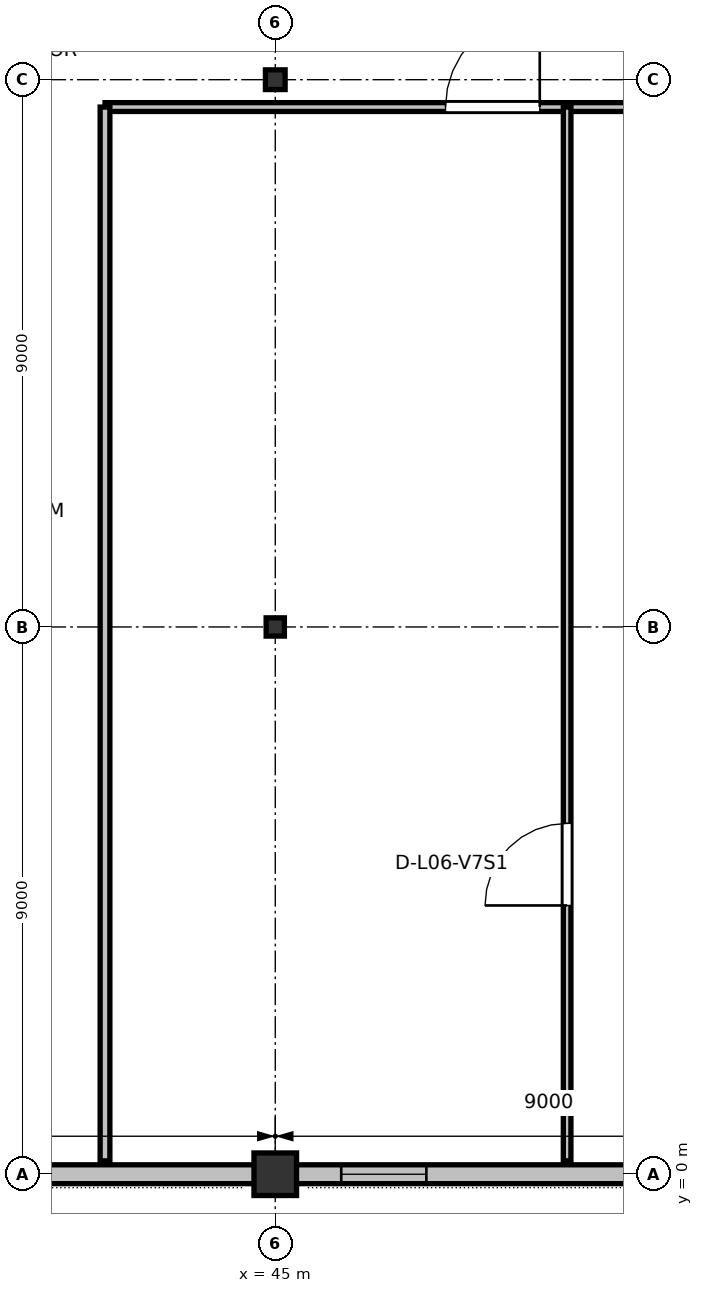
"""IFC4 building model, lengths in metres.
Left out: names, types, materials, properties, quantities, classifications, styles, units other than length and angle.
Written with IfcOpenShell. Run it as: python <this file> out.ifc"""

import sys

from ifc_helpers import new_model, si_unit, direction, frame, frame_2d, origin, origin_2d, place, context, subcontext, project, spatial, rectangle, hollow_circle, i_section, extrude, element, fill, save


model = new_model("IFC4")
c1 = context("Model", 3, precision=1e-05, world=origin(), true_north=direction((0.0, 1.0)))
c2 = subcontext(c1, "Body", "Model", "MODEL_VIEW")
j1 = project(units=[si_unit("LENGTHUNIT", "METRE"), si_unit("PLANEANGLEUNIT", "RADIAN")], contexts=[c1])
p1 = place(None, origin())
s1 = spatial("IfcSite", under=j1, at=p1, CompositionType="ELEMENT")
p2 = place(p1, origin())
s2 = spatial("IfcBuilding", under=s1, at=p2, CompositionType="ELEMENT")
p3 = place(p2, frame((0.0, 0.0, 27.6)))
s3 = spatial("IfcBuildingStorey", under=s2, at=p3, CompositionType="ELEMENT", Elevation=27.6)
p4 = place(p3, frame((45.0, 0.0, 0.0), z_axis=(0.0, 0.0, 1.0), x_axis=(1.0, 0.0, 0.0)))
e1 = element("IfcColumn", 1, at=p4, inside=s3, PredefinedType="COLUMN", context=c2, shape_type="SweptSolid", body=[
    extrude(rectangle(XDim=0.7, YDim=0.7, at=origin_2d()), origin(), (0.0, 0.0, 1.0), 4.2),
])
p5 = place(p3, frame((45.0, 9.0, 0.0), z_axis=(0.0, 0.0, 1.0), x_axis=(1.0, 0.0, 0.0)))
e2 = element("IfcColumn", 2, at=p5, inside=s3, PredefinedType="COLUMN", context=c2, shape_type="SweptSolid", body=[
    extrude(i_section(OverallWidth=0.3, OverallDepth=0.3, WebThickness=0.011, FlangeThickness=0.019, at=origin_2d()), origin(), (0.0, 0.0, 1.0), 4.2),
])
p6 = place(p3, frame((45.0, 18.0, 0.0), z_axis=(0.0, 0.0, 1.0), x_axis=(1.0, 0.0, 0.0)))
e3 = element("IfcColumn", 3, at=p6, inside=s3, PredefinedType="COLUMN", context=c2, shape_type="SweptSolid", body=[
    extrude(hollow_circle(Radius=0.162, WallThickness=0.016, at=origin_2d()), origin(), (0.0, 0.0, 1.0), 4.2),
])
p7 = place(p3, frame((36.335, 0.0, 0.0), z_axis=(0.0, 0.0, 1.0), x_axis=(1.0, 0.0, 0.0)))
e4 = element("IfcWall", 4, at=p7, inside=s3, PredefinedType="STANDARD", context=c2, shape_type="SweptSolid", body=[
    extrude(rectangle(XDim=8.33, YDim=0.31, at=frame_2d((4.165, 0.0))), origin(), (0.0, 0.0, 1.0), 3.715),
])
p8 = place(p7, frame((0.75, 0.0, 0.9)))
e5 = element("IfcOpeningElement", 5, at=p8, cuts=e4, PredefinedType="OPENING", context=c2, shape_type="SweptSolid", body=[
    extrude(rectangle(XDim=1.6, YDim=1.5, at=frame_2d((0.8, 0.75))), frame((0.0, 0.165, 0.0), z_axis=(0.0, -1.0, 0.0), x_axis=(1.0, 0.0, 0.0)), (0.0, 0.0, 1.0), 0.33),
])
p9 = place(p3, frame((45.335, 0.0, 0.0), z_axis=(0.0, 0.0, 1.0), x_axis=(1.0, 0.0, 0.0)))
e6 = element("IfcWall", 6, at=p9, inside=s3, PredefinedType="STANDARD", context=c2, shape_type="SweptSolid", body=[
    extrude(rectangle(XDim=8.33, YDim=0.31, at=frame_2d((4.165, 0.0))), origin(), (0.0, 0.0, 1.0), 3.715),
])
p10 = place(p9, frame((0.75, 0.0, 0.9)))
e7 = element("IfcOpeningElement", 7, at=p10, cuts=e6, PredefinedType="OPENING", context=c2, shape_type="SweptSolid", body=[
    extrude(rectangle(XDim=1.4, YDim=1.45, at=frame_2d((0.7, 0.725))), frame((0.0, 0.165, 0.0), z_axis=(0.0, -1.0, 0.0), x_axis=(1.0, 0.0, 0.0)), (0.0, 0.0, 1.0), 0.33),
])
p11 = place(p3, frame((42.2, 17.55, 0.0), z_axis=(0.0, 0.0, 1.0), x_axis=(1.0, 0.0, 0.0)))
e8 = element("IfcWall", 8, at=p11, inside=s3, PredefinedType="PARTITIONING", context=c2, shape_type="SweptSolid", body=[
    extrude(rectangle(XDim=23.6, YDim=0.145, at=frame_2d((11.8, 0.0))), origin(), (0.0, 0.0, 1.0), 3.96),
])
p12 = place(p11, frame((5.6, 0.0, 0.0)))
e9 = element("IfcOpeningElement", 9, at=p12, cuts=e8, PredefinedType="OPENING", context=c2, shape_type="SweptSolid", body=[
    extrude(rectangle(XDim=1.55, YDim=2.24, at=frame_2d((0.775, 1.12))), frame((0.0, 0.083, 0.0), z_axis=(0.0, -1.0, 0.0), x_axis=(1.0, 0.0, 0.0)), (0.0, 0.0, 1.0), 0.165),
])
p13 = place(p11, frame((15.1, 0.0, 0.0)))
e10 = element("IfcOpeningElement", 10, at=p13, cuts=e8, PredefinedType="OPENING", context=c2, shape_type="SweptSolid", body=[
    extrude(rectangle(XDim=1.05, YDim=2.15, at=frame_2d((0.525, 1.075))), frame((0.0, 0.083, 0.0), z_axis=(0.0, -1.0, 0.0), x_axis=(1.0, 0.0, 0.0)), (0.0, 0.0, 1.0), 0.165),
])
p14 = place(p11, frame((17.05, 0.0, 0.0)))
e11 = element("IfcOpeningElement", 11, at=p14, cuts=e8, PredefinedType="OPENING", context=c2, shape_type="SweptSolid", body=[
    extrude(rectangle(XDim=1.0, YDim=2.14, at=frame_2d((0.5, 1.07))), frame((0.0, 0.083, 0.0), z_axis=(0.0, -1.0, 0.0), x_axis=(1.0, 0.0, 0.0)), (0.0, 0.0, 1.0), 0.165),
])
p15 = place(p3, frame((42.2, 0.22, 0.0), z_axis=(0.0, 0.0, 1.0), x_axis=(0.0, 1.0, 0.0)))
e12 = element("IfcWall", 12, at=p15, inside=s3, PredefinedType="PARTITIONING", context=c2, shape_type="SweptSolid", body=[
    extrude(rectangle(XDim=17.33, YDim=0.16, at=frame_2d((8.665, 0.0))), origin(), (0.0, 0.0, 1.0), 3.96),
])
p16 = place(p3, frame((49.8, 0.22, 0.0), z_axis=(0.0, 0.0, 1.0), x_axis=(0.0, 1.0, 0.0)))
e13 = element("IfcWall", 13, at=p16, inside=s3, PredefinedType="PARTITIONING", context=c2, shape_type="SweptSolid", body=[
    extrude(rectangle(XDim=17.33, YDim=0.125, at=frame_2d((8.665, 0.0))), origin(), (0.0, 0.0, 1.0), 3.96),
])
p17 = place(p16, frame((4.2, 0.0, 0.0)))
e14 = element("IfcOpeningElement", 14, at=p17, cuts=e13, PredefinedType="OPENING", context=c2, shape_type="SweptSolid", body=[
    extrude(rectangle(XDim=1.35, YDim=2.18, at=frame_2d((0.675, 1.09))), frame((0.0, 0.073, 0.0), z_axis=(0.0, -1.0, 0.0), x_axis=(1.0, 0.0, 0.0)), (0.0, 0.0, 1.0), 0.145),
])
p18 = place(p10, origin())
e15 = element("IfcWindow", 15, at=p18, inside=s3, PartitioningType="SINGLE_PANEL", PredefinedType="WINDOW", context=c2, shape_type="SweptSolid", body=[
    extrude(rectangle(XDim=1.4, YDim=1.45, at=frame_2d((0.7, 0.725))), frame((0.0, 0.03, 0.0), z_axis=(0.0, -1.0, 0.0), x_axis=(1.0, 0.0, 0.0)), (0.0, 0.0, 1.0), 0.06),
])
fill(e7, e15)
p19 = place(p12, origin())
e16 = element("IfcDoor", 16, at=p19, inside=s3, OperationType="SINGLE_SWING_RIGHT", PredefinedType="DOOR", context=c2, shape_type="SweptSolid", body=[
    extrude(rectangle(XDim=1.55, YDim=2.24, at=frame_2d((0.775, 1.12))), frame((0.0, 0.025, 0.0), z_axis=(0.0, -1.0, 0.0), x_axis=(1.0, 0.0, 0.0)), (0.0, 0.0, 1.0), 0.05),
])
fill(e9, e16)
p20 = place(p17, origin())
e17 = element("IfcDoor", 17, at=p20, inside=s3, OperationType="SINGLE_SWING_LEFT", PredefinedType="DOOR", context=c2, shape_type="SweptSolid", body=[
    extrude(rectangle(XDim=1.35, YDim=2.18, at=frame_2d((0.675, 1.09))), frame((0.0, 0.025, 0.0), z_axis=(0.0, -1.0, 0.0), x_axis=(1.0, 0.0, 0.0)), (0.0, 0.0, 1.0), 0.05),
])
fill(e14, e17)
save(model, sys.argv[1])
